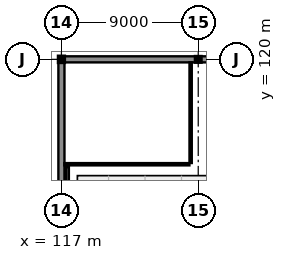
"""IFC4 building model, lengths in metres.
Left out: names, types, materials, properties, quantities, classifications, styles, units other than length and angle.
Written with IfcOpenShell. Run it as: python <this file> out.ifc"""

import sys

from ifc_helpers import new_model, si_unit, direction, frame, frame_2d, origin, origin_2d, place, context, subcontext, project, spatial, rectangle, i_section, extrude, element, fill, save


model = new_model("IFC4")
c1 = context("Model", 3, precision=1e-05, world=origin(), true_north=direction((0.0, 1.0)))
c2 = subcontext(c1, "Body", "Model", "MODEL_VIEW")
j1 = project(units=[si_unit("LENGTHUNIT", "METRE"), si_unit("PLANEANGLEUNIT", "RADIAN")], contexts=[c1])
p1 = place(None, origin())
s1 = spatial("IfcSite", under=j1, at=p1, CompositionType="ELEMENT")
p2 = place(p1, origin())
s2 = spatial("IfcBuilding", under=s1, at=p2, CompositionType="ELEMENT")
p3 = place(p2, origin())
s3 = spatial("IfcBuildingStorey", under=s2, at=p3, CompositionType="ELEMENT", Elevation=0.0)
p4 = place(p3, frame((117.0, 120.0, 0.0), z_axis=(0.0, 0.0, 1.0), x_axis=(1.0, 0.0, 0.0)))
e1 = element("IfcColumn", 1, at=p4, inside=s3, PredefinedType="COLUMN", context=c2, shape_type="SweptSolid", body=[
    extrude(i_section(OverallWidth=0.3, OverallDepth=0.32, WebThickness=0.011, FlangeThickness=0.021, at=origin_2d()), origin(), (0.0, 0.0, 1.0), 5.4),
])
p5 = place(p3, frame((126.0, 120.0, 0.0), z_axis=(0.0, 0.0, 1.0), x_axis=(1.0, 0.0, 0.0)))
e2 = element("IfcColumn", 2, at=p5, inside=s3, PredefinedType="COLUMN", context=c2, shape_type="SweptSolid", body=[
    extrude(i_section(OverallWidth=0.28, OverallDepth=0.28, WebThickness=0.01, FlangeThickness=0.018, at=origin_2d()), origin(), (0.0, 0.0, 1.0), 5.4),
])
p6 = place(p3, frame((134.852, 120.0, 0.0), z_axis=(0.0, 0.0, 1.0), x_axis=(-1.0, 0.0, 0.0)))
e3 = element("IfcWall", 3, at=p6, inside=s3, PredefinedType="SOLIDWALL", context=c2, shape_type="SweptSolid", body=[
    extrude(rectangle(XDim=8.844, YDim=0.4, at=frame_2d((4.422, 0.0))), origin(), (0.0, 0.0, 1.0), 5.08),
])
p7 = place(p6, frame((1.576, 0.0, 2.35)))
e4 = element("IfcOpeningElement", 4, at=p7, cuts=e3, PredefinedType="OPENING", context=c2, shape_type="SweptSolid", body=[
    extrude(rectangle(XDim=1.8, YDim=0.75, at=frame_2d((0.9, 0.375))), frame((0.0, 0.215, 0.0), z_axis=(0.0, -1.0, 0.0), x_axis=(1.0, 0.0, 0.0)), (0.0, 0.0, 1.0), 0.43),
])
p8 = place(p6, frame((5.468, 0.0, 2.35)))
e5 = element("IfcOpeningElement", 5, at=p8, cuts=e3, PredefinedType="OPENING", context=c2, shape_type="SweptSolid", body=[
    extrude(rectangle(XDim=1.8, YDim=0.75, at=frame_2d((0.9, 0.375))), frame((0.0, 0.215, 0.0), z_axis=(0.0, -1.0, 0.0), x_axis=(1.0, 0.0, 0.0)), (0.0, 0.0, 1.0), 0.43),
])
p9 = place(p3, frame((125.992, 120.0, 0.0), z_axis=(0.0, 0.0, 1.0), x_axis=(-1.0, 0.0, 0.0)))
e6 = element("IfcWall", 6, at=p9, inside=s3, PredefinedType="SOLIDWALL", context=c2, shape_type="SweptSolid", body=[
    extrude(rectangle(XDim=8.984, YDim=0.4, at=frame_2d((4.492, 0.0))), origin(), (0.0, 0.0, 1.0), 5.08),
])
p10 = place(p9, frame((3.192, 0.0, 0.0)))
e7 = element("IfcOpeningElement", 7, at=p10, cuts=e6, PredefinedType="OPENING", context=c2, shape_type="SweptSolid", body=[
    extrude(rectangle(XDim=2.6, YDim=2.6, at=frame_2d((1.3, 1.3))), frame((0.0, 0.215, 0.0), z_axis=(0.0, -1.0, 0.0), x_axis=(1.0, 0.0, 0.0)), (0.0, 0.0, 1.0), 0.43),
])
p11 = place(p3, frame((117.0, 119.842, 0.0), z_axis=(0.0, 0.0, 1.0), x_axis=(0.0, -1.0, 0.0)))
e8 = element("IfcWall", 8, at=p11, inside=s3, PredefinedType="SOLIDWALL", context=c2, shape_type="SweptSolid", body=[
    extrude(rectangle(XDim=11.694, YDim=0.4, at=frame_2d((5.847, 0.0))), origin(), (0.0, 0.0, 1.0), 5.08),
])
p12 = place(p11, frame((2.908, 0.0, 2.35)))
e9 = element("IfcOpeningElement", 9, at=p12, cuts=e8, PredefinedType="OPENING", context=c2, shape_type="SweptSolid", body=[
    extrude(rectangle(XDim=1.2, YDim=0.7, at=frame_2d((0.6, 0.35))), frame((0.0, 0.215, 0.0), z_axis=(0.0, -1.0, 0.0), x_axis=(1.0, 0.0, 0.0)), (0.0, 0.0, 1.0), 0.43),
])
p13 = place(p11, frame((7.586, 0.0, 2.35)))
e10 = element("IfcOpeningElement", 10, at=p13, cuts=e8, PredefinedType="OPENING", context=c2, shape_type="SweptSolid", body=[
    extrude(rectangle(XDim=1.2, YDim=0.7, at=frame_2d((0.6, 0.35))), frame((0.0, 0.215, 0.0), z_axis=(0.0, -1.0, 0.0), x_axis=(1.0, 0.0, 0.0)), (0.0, 0.0, 1.0), 0.43),
])
p14 = place(p3, frame((117.4, 96.08, 0.0), z_axis=(0.0, 0.0, 1.0), x_axis=(0.0, 1.0, 0.0)))
e11 = element("IfcWall", 11, at=p14, inside=s3, PredefinedType="PARTITIONING", context=c2, shape_type="SweptSolid", body=[
    extrude(rectangle(XDim=16.84, YDim=0.18, at=frame_2d((8.42, 0.0))), origin(), (0.0, 0.0, 1.0), 5.04),
])
p15 = place(p3, frame((125.5, 119.805, 0.0), z_axis=(0.0, 0.0, 1.0), x_axis=(0.0, -1.0, 0.0)))
e12 = element("IfcWall", 12, at=p15, inside=s3, PredefinedType="PARTITIONING", context=c2, shape_type="SweptSolid", body=[
    extrude(rectangle(XDim=6.625, YDim=0.15, at=frame_2d((3.312, 0.0))), origin(), (0.0, 0.0, 1.0), 5.04),
])
p16 = place(p15, frame((2.788, 0.0, 0.0)))
e13 = element("IfcOpeningElement", 13, at=p16, cuts=e12, PredefinedType="OPENING", context=c2, shape_type="SweptSolid", body=[
    extrude(rectangle(XDim=1.05, YDim=2.25, at=frame_2d((0.525, 1.125))), frame((0.0, 0.09, 0.0), z_axis=(0.0, -1.0, 0.0), x_axis=(1.0, 0.0, 0.0)), (0.0, 0.0, 1.0), 0.18),
])
p17 = place(p3, frame((125.42, 113.1, 0.0), z_axis=(0.0, 0.0, 1.0), x_axis=(-1.0, 0.0, 0.0)))
e14 = element("IfcWall", 14, at=p17, inside=s3, PredefinedType="PARTITIONING", context=c2, shape_type="SweptSolid", body=[
    extrude(rectangle(XDim=8.225, YDim=0.15, at=frame_2d((4.112, 0.0))), origin(), (0.0, 0.0, 1.0), 5.04),
])
p18 = place(p10, frame((2.6, 0.0, 0.0), z_axis=(0.0, 0.0, 1.0), x_axis=(-1.0, 0.0, 0.0)))
e15 = element("IfcDoor", 15, at=p18, inside=s3, OperationType="DOUBLE_DOOR_SINGLE_SWING", PredefinedType="GATE", context=c2, shape_type="SweptSolid", body=[
    extrude(rectangle(XDim=2.6, YDim=2.6, at=frame_2d((1.3, 1.3))), frame((0.0, 0.025, 0.0), z_axis=(0.0, -1.0, 0.0), x_axis=(1.0, 0.0, 0.0)), (0.0, 0.0, 1.0), 0.05),
])
fill(e7, e15)
p19 = place(p12, origin())
e16 = element("IfcWindow", 16, at=p19, inside=s3, PartitioningType="SINGLE_PANEL", PredefinedType="WINDOW", context=c2, shape_type="SweptSolid", body=[
    extrude(rectangle(XDim=1.2, YDim=0.7, at=frame_2d((0.6, 0.35))), frame((0.0, 0.03, 0.0), z_axis=(0.0, -1.0, 0.0), x_axis=(1.0, 0.0, 0.0)), (0.0, 0.0, 1.0), 0.06),
])
fill(e9, e16)
p20 = place(p13, origin())
e17 = element("IfcWindow", 17, at=p20, inside=s3, PartitioningType="SINGLE_PANEL", PredefinedType="WINDOW", context=c2, shape_type="SweptSolid", body=[
    extrude(rectangle(XDim=1.2, YDim=0.7, at=frame_2d((0.6, 0.35))), frame((0.0, 0.03, 0.0), z_axis=(0.0, -1.0, 0.0), x_axis=(1.0, 0.0, 0.0)), (0.0, 0.0, 1.0), 0.06),
])
fill(e10, e17)
p21 = place(p16, origin())
e18 = element("IfcDoor", 18, at=p21, inside=s3, OperationType="SINGLE_SWING_RIGHT", PredefinedType="DOOR", context=c2, shape_type="SweptSolid", body=[
    extrude(rectangle(XDim=1.05, YDim=2.25, at=frame_2d((0.525, 1.125))), frame((0.0, 0.025, 0.0), z_axis=(0.0, -1.0, 0.0), x_axis=(1.0, 0.0, 0.0)), (0.0, 0.0, 1.0), 0.05),
])
fill(e13, e18)
save(model, sys.argv[1])
